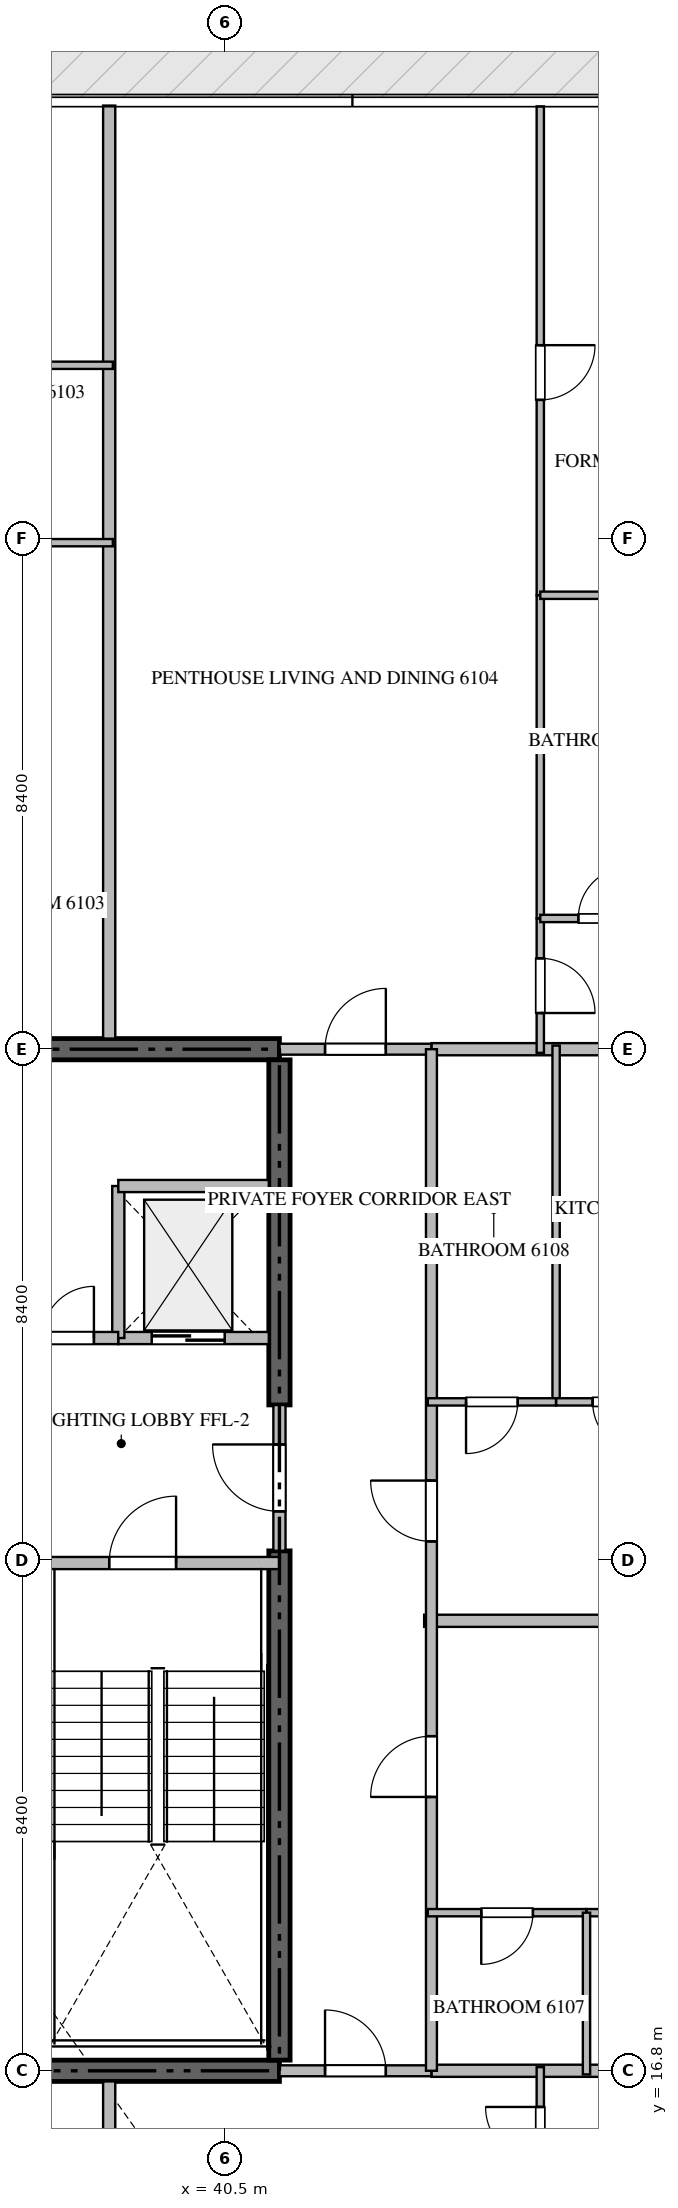
"""IFC4 building model, lengths in metres.
Left out: names, types, materials, properties, quantities, classifications, styles, units other than length and angle.
Written with IfcOpenShell. Run it as: python <this file> out.ifc"""

import sys

from ifc_helpers import new_model, si_unit, direction, frame, frame_2d, origin, place, context, subcontext, project, spatial, rectangle, extrude, source, transform, mapped, element, fill, save


model = new_model("IFC4")
c1 = context("Model", 3, precision=1e-05, world=origin(), true_north=direction((0.0, 1.0)))
c2 = subcontext(c1, "Body", "Model", "MODEL_VIEW")
j1 = project(units=[si_unit("LENGTHUNIT", "METRE"), si_unit("PLANEANGLEUNIT", "RADIAN")], contexts=[c1])
p1 = place(None, origin())
s1 = spatial("IfcSite", under=j1, at=p1, CompositionType="ELEMENT")
p2 = place(p1, origin())
s2 = spatial("IfcBuilding", under=s1, at=p2, CompositionType="ELEMENT")
p3 = place(p2, frame((0.0, 0.0, 245.1)))
s3 = spatial("IfcBuildingStorey", under=s2, at=p3, CompositionType="ELEMENT", Elevation=245.1)
for number, where, z_axis, x_axis in (
    (1, (23.4, 16.8, -0.26), (0.0, 0.0, 1.0), (1.0, 0.0, 0.0)),
    (2, (41.4, 33.6, -0.26), (0.0, 0.0, 1.0), (-1.0, 0.0, 0.0)),
):
    element("IfcWall", number, at=place(p3, frame(where, z_axis=z_axis, x_axis=x_axis)), inside=s3, PredefinedType="SHEAR", context=c2, shape_type="SweptSolid", body=[
        extrude(rectangle(XDim=18.0, YDim=0.35, at=frame_2d((9.0, 0.0))), origin(), (0.0, 0.0, 1.0), 3.848),
    ])
p4 = place(p3, frame((41.4, 16.975, -0.26), z_axis=(0.0, 0.0, 1.0), x_axis=(0.0, 1.0, 0.0)))
e3 = element("IfcWall", 3, at=p4, inside=s3, PredefinedType="SHEAR", context=c2, shape_type="SweptSolid", body=[
    extrude(rectangle(XDim=8.375, YDim=0.35, at=frame_2d((4.188, 0.0))), origin(), (0.0, 0.0, 1.0), 3.848),
])
p5 = place(p3, frame((41.4, 27.75, -0.26), z_axis=(0.0, 0.0, 1.0), x_axis=(0.0, 1.0, 0.0)))
e4 = element("IfcWall", 4, at=p5, inside=s3, PredefinedType="SHEAR", context=c2, shape_type="SweptSolid", body=[
    extrude(rectangle(XDim=5.675, YDim=0.35, at=frame_2d((2.837, 0.0))), origin(), (0.0, 0.0, 1.0), 3.848),
])
p6 = place(p3, frame((36.95, 25.15, 0.0), z_axis=(0.0, 0.0, 1.0), x_axis=(1.0, 0.0, 0.0)))
e5 = element("IfcWall", 5, at=p6, inside=s3, PredefinedType="STANDARD", context=c2, shape_type="SweptSolid", body=[
    extrude(rectangle(XDim=4.45, YDim=0.2, at=frame_2d((2.225, 0.0))), origin(), (0.0, 0.0, 1.0), 3.59),
])
p7 = place(p6, frame((1.65, 0.0, 0.0)))
e6 = element("IfcOpeningElement", 6, at=p7, cuts=e5, PredefinedType="OPENING", context=c2, shape_type="SweptSolid", body=[
    extrude(rectangle(XDim=1.1, YDim=2.15, at=frame_2d((0.55, 1.075))), frame((0.0, 0.11, 0.0), z_axis=(0.0, -1.0, 0.0), x_axis=(1.0, 0.0, 0.0)), (0.0, 0.0, 1.0), 0.22),
])
p8 = place(p3, frame((38.75, 28.85, 0.0), z_axis=(0.0, 0.0, 1.0), x_axis=(1.0, 0.0, 0.0)))
e7 = element("IfcWall", 7, at=p8, inside=s3, PredefinedType="STANDARD", context=c2, shape_type="SweptSolid", body=[
    extrude(rectangle(XDim=2.475, YDim=0.2, at=frame_2d((1.238, 0.0))), origin(), (0.0, 0.0, 1.0), 3.59),
])
p9 = place(p8, frame((0.55, 0.0, 0.0)))
e8 = element("IfcOpeningElement", 8, at=p9, cuts=e7, PredefinedType="OPENING", context=c2, shape_type="SweptSolid", body=[
    extrude(rectangle(XDim=1.2, YDim=2.2, at=frame_2d((0.6, 1.1))), frame((0.0, 0.11, 0.0), z_axis=(0.0, -1.0, 0.0), x_axis=(1.0, 0.0, 0.0)), (0.0, 0.0, 1.0), 0.22),
])
p10 = place(p3, frame((38.75, 28.85, 0.0), z_axis=(0.0, 0.0, 1.0), x_axis=(0.0, 1.0, 0.0)))
e9 = element("IfcWall", 9, at=p10, inside=s3, PredefinedType="STANDARD", context=c2, shape_type="SweptSolid", body=[
    extrude(rectangle(XDim=2.5, YDim=0.2, at=frame_2d((1.25, 0.0))), origin(), (0.0, 0.0, 1.0), 3.59),
])
p11 = place(p3, frame((38.75, 31.35, 0.0), z_axis=(0.0, 0.0, 1.0), x_axis=(1.0, 0.0, 0.0)))
e10 = element("IfcWall", 10, at=p11, inside=s3, PredefinedType="STANDARD", context=c2, shape_type="SweptSolid", body=[
    extrude(rectangle(XDim=2.475, YDim=0.2, at=frame_2d((1.238, 0.0))), origin(), (0.0, 0.0, 1.0), 3.59),
])
p12 = place(p3, frame((37.1, 28.85, 0.0), z_axis=(0.0, 0.0, 1.0), x_axis=(1.0, 0.0, 0.0)))
e11 = element("IfcWall", 11, at=p12, inside=s3, PredefinedType="STANDARD", context=c2, shape_type="SweptSolid", body=[
    extrude(rectangle(XDim=1.648, YDim=0.2, at=frame_2d((0.824, 0.0))), origin(), (0.0, 0.0, 1.0), 3.59),
])
p13 = place(p12, frame((0.399, 0.0, 0.0)))
e12 = element("IfcOpeningElement", 12, at=p13, cuts=e11, PredefinedType="OPENING", context=c2, shape_type="SweptSolid", body=[
    extrude(rectangle(XDim=0.85, YDim=2.1, at=frame_2d((0.425, 1.05))), frame((0.0, 0.11, 0.0), z_axis=(0.0, -1.0, 0.0), x_axis=(1.0, 0.0, 0.0)), (0.0, 0.0, 1.0), 0.22),
])
p14 = place(p3, frame((41.4, 25.352, 0.0), z_axis=(0.0, 0.0, 1.0), x_axis=(0.0, 1.0, 0.0)))
e13 = element("IfcWall", 13, at=p14, inside=s3, PredefinedType="STANDARD", context=c2, shape_type="SweptSolid", body=[
    extrude(rectangle(XDim=2.396, YDim=0.2, at=frame_2d((1.198, 0.0))), origin(), (0.0, 0.0, 1.0), 3.59),
])
p15 = place(p14, frame((0.648, 0.0, 0.0)))
e14 = element("IfcOpeningElement", 14, at=p15, cuts=e13, PredefinedType="OPENING", context=c2, shape_type="SweptSolid", body=[
    extrude(rectangle(XDim=1.1, YDim=2.15, at=frame_2d((0.55, 1.075))), frame((0.0, 0.11, 0.0), z_axis=(0.0, -1.0, 0.0), x_axis=(1.0, 0.0, 0.0)), (0.0, 0.0, 1.0), 0.22),
])
for number, where, z_axis, x_axis in (
    (15, (38.6, 1.282, 0.0), (0.0, 0.0, 1.0), (0.0, 1.0, 0.0)),
    (16, (38.6, 33.775, 0.0), (0.0, 0.0, 1.0), (0.0, 1.0, 0.0)),
):
    element("IfcWall", number, at=place(p3, frame(where, z_axis=z_axis, x_axis=x_axis)), inside=s3, PredefinedType="PARTITIONING", context=c2, shape_type="SweptSolid", body=[
        extrude(rectangle(XDim=15.343, YDim=0.2, at=frame_2d((7.671, 0.0))), origin(), (0.0, 0.0, 1.0), 3.59),
    ])
p16 = place(p3, frame((43.78, 24.2, 0.0), z_axis=(0.0, 0.0, 1.0), x_axis=(1.0, 0.0, 0.0)))
e17 = element("IfcWall", 17, at=p16, inside=s3, PredefinedType="PARTITIONING", context=c2, shape_type="SweptSolid", body=[
    extrude(rectangle(XDim=13.538, YDim=0.2, at=frame_2d((6.769, 0.0))), origin(), (0.0, 0.0, 1.0), 3.59),
])
for number, where, z_axis, x_axis in (
    (18, (43.9, 16.8, 0.0), (0.0, 0.0, 1.0), (1.0, 0.0, 0.0)),
    (19, (43.9, 33.6, 0.0), (0.0, 0.0, 1.0), (1.0, 0.0, 0.0)),
):
    element("IfcWall", number, at=place(p3, frame(where, z_axis=z_axis, x_axis=x_axis)), inside=s3, PredefinedType="PARTITIONING", context=c2, shape_type="SweptSolid", body=[
        extrude(rectangle(XDim=13.418, YDim=0.2, at=frame_2d((6.709, 0.0))), origin(), (0.0, 0.0, 1.0), 3.59),
    ])
p17 = place(p3, frame((41.402, 16.8, 0.0), z_axis=(0.0, 0.0, 1.0), x_axis=(1.0, 0.0, 0.0)))
e20 = element("IfcWall", 20, at=p17, inside=s3, PredefinedType="PARTITIONING", context=c2, shape_type="SweptSolid", body=[
    extrude(rectangle(XDim=2.496, YDim=0.18, at=frame_2d((1.248, 0.0))), origin(), (0.0, 0.0, 1.0), 3.59),
])
p18 = place(p17, frame((0.748, 0.0, 0.0)))
e21 = element("IfcOpeningElement", 21, at=p18, cuts=e20, PredefinedType="OPENING", context=c2, shape_type="SweptSolid", body=[
    extrude(rectangle(XDim=1.0, YDim=2.15, at=frame_2d((0.5, 1.075))), frame((0.0, 0.1, 0.0), z_axis=(0.0, -1.0, 0.0), x_axis=(1.0, 0.0, 0.0)), (0.0, 0.0, 1.0), 0.2),
])
p19 = place(p3, frame((41.402, 33.6, 0.0), z_axis=(0.0, 0.0, 1.0), x_axis=(1.0, 0.0, 0.0)))
e22 = element("IfcWall", 22, at=p19, inside=s3, PredefinedType="PARTITIONING", context=c2, shape_type="SweptSolid", body=[
    extrude(rectangle(XDim=2.496, YDim=0.18, at=frame_2d((1.248, 0.0))), origin(), (0.0, 0.0, 1.0), 3.59),
])
p20 = place(p19, frame((0.748, 0.0, 0.0)))
e23 = element("IfcOpeningElement", 23, at=p20, cuts=e22, PredefinedType="OPENING", context=c2, shape_type="SweptSolid", body=[
    extrude(rectangle(XDim=1.0, YDim=2.15, at=frame_2d((0.5, 1.075))), frame((0.0, 0.1, 0.0), z_axis=(0.0, -1.0, 0.0), x_axis=(1.0, 0.0, 0.0)), (0.0, 0.0, 1.0), 0.2),
])
p21 = place(p3, frame((43.9, 16.8, 0.0), z_axis=(0.0, 0.0, 1.0), x_axis=(0.0, 1.0, 0.0)))
e24 = element("IfcWall", 24, at=p21, inside=s3, PredefinedType="PARTITIONING", context=c2, shape_type="SweptSolid", body=[
    extrude(rectangle(XDim=16.8, YDim=0.18, at=frame_2d((8.4, 0.0))), origin(), (0.0, 0.0, 1.0), 3.59),
])
p22 = place(p21, frame((4.503, 0.0, 0.0)))
e25 = element("IfcOpeningElement", 25, at=p22, cuts=e24, PredefinedType="OPENING", context=c2, shape_type="SweptSolid", body=[
    extrude(rectangle(XDim=1.0, YDim=2.15, at=frame_2d((0.5, 1.075))), frame((0.0, 0.1, 0.0), z_axis=(0.0, -1.0, 0.0), x_axis=(1.0, 0.0, 0.0)), (0.0, 0.0, 1.0), 0.2),
])
p23 = place(p21, frame((8.706, 0.0, 0.0)))
e26 = element("IfcOpeningElement", 26, at=p23, cuts=e24, PredefinedType="OPENING", context=c2, shape_type="SweptSolid", body=[
    extrude(rectangle(XDim=1.0, YDim=2.15, at=frame_2d((0.5, 1.075))), frame((0.0, 0.1, 0.0), z_axis=(0.0, -1.0, 0.0), x_axis=(1.0, 0.0, 0.0)), (0.0, 0.0, 1.0), 0.2),
])
p24 = place(p3, frame((45.69, 14.65, 0.0), z_axis=(0.0, 0.0, 1.0), x_axis=(0.0, 1.0, 0.0)))
e27 = element("IfcWall", 27, at=p24, inside=s3, PredefinedType="PARTITIONING", context=c2, shape_type="SweptSolid", body=[
    extrude(rectangle(XDim=2.21, YDim=0.12, at=frame_2d((1.105, 0.0))), origin(), (0.0, 0.0, 1.0), 3.59),
])
p25 = place(p24, frame((0.655, 0.0, 0.0)))
e28 = element("IfcOpeningElement", 28, at=p25, cuts=e27, PredefinedType="OPENING", context=c2, shape_type="SweptSolid", body=[
    extrude(rectangle(XDim=0.9, YDim=2.1, at=frame_2d((0.45, 1.05))), frame((0.0, 0.07, 0.0), z_axis=(0.0, -1.0, 0.0), x_axis=(1.0, 0.0, 0.0)), (0.0, 0.0, 1.0), 0.14),
])
for number, where, z_axis, x_axis in (
    (29, (33.8, 44.847, 0.0), (0.0, 0.0, 1.0), (1.0, 0.0, 0.0)),
    (30, (33.8, 41.93, 0.0), (0.0, 0.0, 1.0), (1.0, 0.0, 0.0)),
):
    element("IfcWall", number, at=place(p3, frame(where, z_axis=z_axis, x_axis=x_axis)), inside=s3, PredefinedType="PARTITIONING", context=c2, shape_type="SweptSolid", body=[
        extrude(rectangle(XDim=4.86, YDim=0.12, at=frame_2d((2.43, 0.0))), origin(), (0.0, 0.0, 1.0), 3.59),
    ])
p26 = place(p3, frame((45.69, 35.75, 0.0), z_axis=(0.0, 0.0, 1.0), x_axis=(0.0, -1.0, 0.0)))
e31 = element("IfcWall", 31, at=p26, inside=s3, PredefinedType="PARTITIONING", context=c2, shape_type="SweptSolid", body=[
    extrude(rectangle(XDim=2.21, YDim=0.12, at=frame_2d((1.105, 0.0))), origin(), (0.0, 0.0, 1.0), 3.59),
])
p27 = place(p26, frame((0.655, 0.0, 0.0)))
e32 = element("IfcOpeningElement", 32, at=p27, cuts=e31, PredefinedType="OPENING", context=c2, shape_type="SweptSolid", body=[
    extrude(rectangle(XDim=0.9, YDim=2.1, at=frame_2d((0.45, 1.05))), frame((0.0, 0.07, 0.0), z_axis=(0.0, -1.0, 0.0), x_axis=(1.0, 0.0, 0.0)), (0.0, 0.0, 1.0), 0.14),
])
p28 = place(p3, frame((45.69, 49.105, 0.0), z_axis=(0.0, 0.0, 1.0), x_axis=(0.0, -1.0, 0.0)))
e33 = element("IfcWall", 33, at=p28, inside=s3, PredefinedType="PARTITIONING", context=c2, shape_type="SweptSolid", body=[
    extrude(rectangle(XDim=8.04, YDim=0.12, at=frame_2d((4.02, 0.0))), origin(), (0.0, 0.0, 1.0), 3.59),
])
p29 = place(p28, frame((3.927, 0.0, 0.0)))
e34 = element("IfcOpeningElement", 34, at=p29, cuts=e33, PredefinedType="OPENING", context=c2, shape_type="SweptSolid", body=[
    extrude(rectangle(XDim=0.9, YDim=2.1, at=frame_2d((0.45, 1.05))), frame((0.0, 0.07, 0.0), z_axis=(0.0, -1.0, 0.0), x_axis=(1.0, 0.0, 0.0)), (0.0, 0.0, 1.0), 0.14),
])
p30 = place(p3, frame((45.69, 41.063, 0.0), z_axis=(0.0, 0.0, 1.0), x_axis=(0.0, -1.0, 0.0)))
e35 = element("IfcWall", 35, at=p30, inside=s3, PredefinedType="PARTITIONING", context=c2, shape_type="SweptSolid", body=[
    extrude(rectangle(XDim=5.311, YDim=0.12, at=frame_2d((2.656, 0.0))), origin(), (0.0, 0.0, 1.0), 3.59),
])
p31 = place(p3, frame((45.69, 41.065, 0.0), z_axis=(0.0, 0.0, 1.0), x_axis=(1.0, 0.0, 0.0)))
e36 = element("IfcWall", 36, at=p31, inside=s3, PredefinedType="PARTITIONING", context=c2, shape_type="SweptSolid", body=[
    extrude(rectangle(XDim=4.85, YDim=0.12, at=frame_2d((2.425, 0.0))), origin(), (0.0, 0.0, 1.0), 3.59),
])
p32 = place(p3, frame((45.69, 35.75, 0.0), z_axis=(0.0, 0.0, 1.0), x_axis=(1.0, 0.0, 0.0)))
e37 = element("IfcWall", 37, at=p32, inside=s3, PredefinedType="PARTITIONING", context=c2, shape_type="SweptSolid", body=[
    extrude(rectangle(XDim=2.1, YDim=0.12, at=frame_2d((1.05, 0.0))), origin(), (0.0, 0.0, 1.0), 3.59),
])
p33 = place(p32, frame((0.625, 0.0, 0.0)))
e38 = element("IfcOpeningElement", 38, at=p33, cuts=e37, PredefinedType="OPENING", context=c2, shape_type="SweptSolid", body=[
    extrude(rectangle(XDim=0.85, YDim=2.1, at=frame_2d((0.425, 1.05))), frame((0.0, 0.07, 0.0), z_axis=(0.0, -1.0, 0.0), x_axis=(1.0, 0.0, 0.0)), (0.0, 0.0, 1.0), 0.14),
])
p34 = place(p3, frame((49.05, 19.4, 0.0), z_axis=(0.0, 0.0, 1.0), x_axis=(-1.0, 0.0, 0.0)))
e39 = element("IfcWall", 39, at=p34, inside=s3, PredefinedType="PARTITIONING", context=c2, shape_type="SweptSolid", body=[
    extrude(rectangle(XDim=2.6, YDim=0.12, at=frame_2d((1.3, 0.0))), origin(), (0.0, 0.0, 1.0), 3.59),
])
p35 = place(p34, frame((0.875, 0.0, 0.0)))
e40 = element("IfcOpeningElement", 40, at=p35, cuts=e39, PredefinedType="OPENING", context=c2, shape_type="SweptSolid", body=[
    extrude(rectangle(XDim=0.85, YDim=2.1, at=frame_2d((0.425, 1.05))), frame((0.0, 0.07, 0.0), z_axis=(0.0, -1.0, 0.0), x_axis=(1.0, 0.0, 0.0)), (0.0, 0.0, 1.0), 0.14),
])
p36 = place(p3, frame((46.448, 19.4, 0.0), z_axis=(0.0, 0.0, 1.0), x_axis=(-1.0, 0.0, 0.0)))
e41 = element("IfcWall", 41, at=p36, inside=s3, PredefinedType="PARTITIONING", context=c2, shape_type="SweptSolid", body=[
    extrude(rectangle(XDim=2.608, YDim=0.12, at=frame_2d((1.304, 0.0))), origin(), (0.0, 0.0, 1.0), 3.59),
])
p37 = place(p36, frame((0.879, 0.0, 0.0)))
e42 = element("IfcOpeningElement", 42, at=p37, cuts=e41, PredefinedType="OPENING", context=c2, shape_type="SweptSolid", body=[
    extrude(rectangle(XDim=0.85, YDim=2.1, at=frame_2d((0.425, 1.05))), frame((0.0, 0.07, 0.0), z_axis=(0.0, -1.0, 0.0), x_axis=(1.0, 0.0, 0.0)), (0.0, 0.0, 1.0), 0.14),
])
p38 = place(p3, frame((46.45, 16.74, 0.0), z_axis=(0.0, 0.0, 1.0), x_axis=(0.0, 1.0, 0.0)))
e43 = element("IfcWall", 43, at=p38, inside=s3, PredefinedType="PARTITIONING", context=c2, shape_type="SweptSolid", body=[
    extrude(rectangle(XDim=2.66, YDim=0.12, at=frame_2d((1.33, 0.0))), origin(), (0.0, 0.0, 1.0), 3.59),
])
p39 = place(p3, frame((45.95, 27.8, 0.0), z_axis=(0.0, 0.0, 1.0), x_axis=(0.0, 1.0, 0.0)))
e44 = element("IfcWall", 44, at=p39, inside=s3, PredefinedType="PARTITIONING", context=c2, shape_type="SweptSolid", body=[
    extrude(rectangle(XDim=5.86, YDim=0.12, at=frame_2d((2.93, 0.0))), origin(), (0.0, 0.0, 1.0), 3.59),
])
p40 = place(p3, frame((48.001, 27.8, 0.0), z_axis=(0.0, 0.0, 1.0), x_axis=(-1.0, 0.0, 0.0)))
e45 = element("IfcWall", 45, at=p40, inside=s3, PredefinedType="PARTITIONING", context=c2, shape_type="SweptSolid", body=[
    extrude(rectangle(XDim=2.051, YDim=0.12, at=frame_2d((1.025, 0.0))), origin(), (0.0, 0.0, 1.0), 3.59),
])
p41 = place(p40, frame((0.6, 0.0, 0.0)))
e46 = element("IfcOpeningElement", 46, at=p41, cuts=e45, PredefinedType="OPENING", context=c2, shape_type="SweptSolid", body=[
    extrude(rectangle(XDim=0.85, YDim=2.1, at=frame_2d((0.425, 1.05))), frame((0.0, 0.07, 0.0), z_axis=(0.0, -1.0, 0.0), x_axis=(1.0, 0.0, 0.0)), (0.0, 0.0, 1.0), 0.14),
])
p42 = place(p3, frame((45.948, 27.8, 0.0), z_axis=(0.0, 0.0, 1.0), x_axis=(-1.0, 0.0, 0.0)))
e47 = element("IfcWall", 47, at=p42, inside=s3, PredefinedType="PARTITIONING", context=c2, shape_type="SweptSolid", body=[
    extrude(rectangle(XDim=2.108, YDim=0.12, at=frame_2d((1.054, 0.0))), origin(), (0.0, 0.0, 1.0), 3.59),
])
p43 = place(p42, frame((0.629, 0.0, 0.0)))
e48 = element("IfcOpeningElement", 48, at=p43, cuts=e47, PredefinedType="OPENING", context=c2, shape_type="SweptSolid", body=[
    extrude(rectangle(XDim=0.85, YDim=2.1, at=frame_2d((0.425, 1.05))), frame((0.0, 0.07, 0.0), z_axis=(0.0, -1.0, 0.0), x_axis=(1.0, 0.0, 0.0)), (0.0, 0.0, 1.0), 0.14),
])
m1 = source(origin(), c2, "Body", "SweptSolid", [
    extrude(rectangle(XDim=1.1, YDim=2.15, at=frame_2d((0.55, 1.075))), frame((0.0, 0.025, 0.0), z_axis=(0.0, -1.0, 0.0), x_axis=(1.0, 0.0, 0.0)), (0.0, 0.0, 1.0), 0.05),
])
p44 = place(p7, origin())
e49 = element("IfcDoor", 49, at=p44, inside=s3, OperationType="SINGLE_SWING_RIGHT", PredefinedType="DOOR", context=c2, shape_type="MappedRepresentation", body=[
    mapped(m1, transform((0.0, 0.0, 0.0), scale=1.0)),
])
fill(e6, e49)
m2 = source(origin(), c2, "Body", "SweptSolid", [
    extrude(rectangle(XDim=1.2, YDim=2.2, at=frame_2d((0.6, 1.1))), frame((0.0, 0.025, 0.0), z_axis=(0.0, -1.0, 0.0), x_axis=(1.0, 0.0, 0.0)), (0.0, 0.0, 1.0), 0.05),
])
p45 = place(p9, origin())
e50 = element("IfcDoor", 50, at=p45, inside=s3, OperationType="DOUBLE_DOOR_SLIDING", PredefinedType="DOOR", context=c2, shape_type="MappedRepresentation", body=[
    mapped(m2, transform((0.0, 0.0, 0.0), scale=1.0)),
])
fill(e8, e50)
m3 = source(origin(), c2, "Body", "SweptSolid", [
    extrude(rectangle(XDim=0.85, YDim=2.1, at=frame_2d((0.425, 1.05))), frame((0.0, 0.025, 0.0), z_axis=(0.0, -1.0, 0.0), x_axis=(1.0, 0.0, 0.0)), (0.0, 0.0, 1.0), 0.05),
])
p46 = place(p13, origin())
e51 = element("IfcDoor", 51, at=p46, inside=s3, OperationType="SINGLE_SWING_RIGHT", PredefinedType="DOOR", context=c2, shape_type="MappedRepresentation", body=[
    mapped(m3, transform((0.0, 0.0, 0.0), scale=1.0)),
])
fill(e12, e51)
p47 = place(p15, origin())
e52 = element("IfcDoor", 52, at=p47, inside=s3, OperationType="SINGLE_SWING_RIGHT", PredefinedType="DOOR", context=c2, shape_type="MappedRepresentation", body=[
    mapped(m1, transform((0.0, 0.0, 0.0), scale=1.0)),
])
fill(e14, e52)
m4 = source(origin(), c2, "Body", "SweptSolid", [
    extrude(rectangle(XDim=1.0, YDim=2.15, at=frame_2d((0.5, 1.075))), frame((0.0, 0.025, 0.0), z_axis=(0.0, -1.0, 0.0), x_axis=(1.0, 0.0, 0.0)), (0.0, 0.0, 1.0), 0.05),
])
p48 = place(p18, origin())
e53 = element("IfcDoor", 53, at=p48, inside=s3, OperationType="SINGLE_SWING_LEFT", PredefinedType="DOOR", context=c2, shape_type="MappedRepresentation", body=[
    mapped(m4, transform((0.0, 0.0, 0.0), scale=1.0)),
])
fill(e21, e53)
p49 = place(p20, origin())
e54 = element("IfcDoor", 54, at=p49, inside=s3, OperationType="SINGLE_SWING_RIGHT", PredefinedType="DOOR", context=c2, shape_type="MappedRepresentation", body=[
    mapped(m4, transform((0.0, 0.0, 0.0), scale=1.0)),
])
fill(e23, e54)
p50 = place(p22, origin())
e55 = element("IfcDoor", 55, at=p50, inside=s3, OperationType="SINGLE_SWING_LEFT", PredefinedType="DOOR", context=c2, shape_type="MappedRepresentation", body=[
    mapped(m4, transform((0.0, 0.0, 0.0), scale=1.0)),
])
fill(e25, e55)
p51 = place(p23, origin())
e56 = element("IfcDoor", 56, at=p51, inside=s3, OperationType="SINGLE_SWING_RIGHT", PredefinedType="DOOR", context=c2, shape_type="MappedRepresentation", body=[
    mapped(m4, transform((0.0, 0.0, 0.0), scale=1.0)),
])
fill(e26, e56)
m5 = source(origin(), c2, "Body", "SweptSolid", [
    extrude(rectangle(XDim=0.9, YDim=2.1, at=frame_2d((0.45, 1.05))), frame((0.0, 0.025, 0.0), z_axis=(0.0, -1.0, 0.0), x_axis=(1.0, 0.0, 0.0)), (0.0, 0.0, 1.0), 0.05),
])
p52 = place(p25, origin())
e57 = element("IfcDoor", 57, at=p52, inside=s3, OperationType="SINGLE_SWING_RIGHT", PredefinedType="DOOR", context=c2, shape_type="MappedRepresentation", body=[
    mapped(m5, transform((0.0, 0.0, 0.0), scale=1.0)),
])
fill(e28, e57)
p53 = place(p27, origin())
e58 = element("IfcDoor", 58, at=p53, inside=s3, OperationType="SINGLE_SWING_RIGHT", PredefinedType="DOOR", context=c2, shape_type="MappedRepresentation", body=[
    mapped(m5, transform((0.0, 0.0, 0.0), scale=1.0)),
])
fill(e32, e58)
p54 = place(p29, origin())
e59 = element("IfcDoor", 59, at=p54, inside=s3, OperationType="SINGLE_SWING_LEFT", PredefinedType="DOOR", context=c2, shape_type="MappedRepresentation", body=[
    mapped(m5, transform((0.0, 0.0, 0.0), scale=1.0)),
])
fill(e34, e59)
p55 = place(p33, origin())
e60 = element("IfcDoor", 60, at=p55, inside=s3, OperationType="SINGLE_SWING_RIGHT", PredefinedType="DOOR", context=c2, shape_type="MappedRepresentation", body=[
    mapped(m3, transform((0.0, 0.0, 0.0), scale=1.0)),
])
fill(e38, e60)
p56 = place(p37, origin())
e61 = element("IfcDoor", 61, at=p56, inside=s3, OperationType="SINGLE_SWING_RIGHT", PredefinedType="DOOR", context=c2, shape_type="MappedRepresentation", body=[
    mapped(m3, transform((0.0, 0.0, 0.0), scale=1.0)),
])
fill(e42, e61)
p57 = place(p41, origin())
e62 = element("IfcDoor", 62, at=p57, inside=s3, OperationType="SINGLE_SWING_LEFT", PredefinedType="DOOR", context=c2, shape_type="MappedRepresentation", body=[
    mapped(m3, transform((0.0, 0.0, 0.0), scale=1.0)),
])
fill(e46, e62)
p58 = place(p43, origin())
e63 = element("IfcDoor", 63, at=p58, inside=s3, OperationType="SINGLE_SWING_RIGHT", PredefinedType="DOOR", context=c2, shape_type="MappedRepresentation", body=[
    mapped(m3, transform((0.0, 0.0, 0.0), scale=1.0)),
])
fill(e48, e63)
save(model, sys.argv[1])
